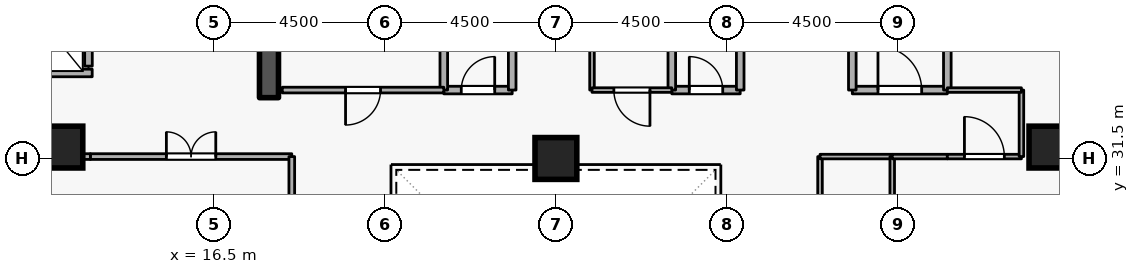
"""IFC4 building model, lengths in metres.
Left out: names, types, materials, properties, quantities, classifications, styles, units other than length and angle.
Written with IfcOpenShell. Run it as: python <this file> out.ifc"""

import sys

from ifc_helpers import new_model, si_unit, direction, frame, frame_2d, origin, origin_2d, place, context, subcontext, project, spatial, rectangle, extrude, element, fill, save


model = new_model("IFC4")
c1 = context("Model", 3, precision=1e-05, world=origin(), true_north=direction((0.0, 1.0)))
c2 = subcontext(c1, "Body", "Model", "MODEL_VIEW")
j1 = project(units=[si_unit("LENGTHUNIT", "METRE"), si_unit("PLANEANGLEUNIT", "RADIAN")], contexts=[c1])
p1 = place(None, origin())
s1 = spatial("IfcSite", under=j1, at=p1, CompositionType="ELEMENT")
p2 = place(p1, origin())
s2 = spatial("IfcBuilding", under=s1, at=p2, CompositionType="ELEMENT")
p3 = place(p2, frame((0.0, 0.0, 192.9)))
s3 = spatial("IfcBuildingStorey", under=s2, at=p3, CompositionType="ELEMENT", Elevation=192.9)
p4 = place(p3, frame((17.95, 33.1, 0.0), z_axis=(0.0, 0.0, 1.0), x_axis=(0.0, 1.0, 0.0)))
e1 = element("IfcWall", 1, at=p4, inside=s3, PredefinedType="SHEAR", context=c2, shape_type="SweptSolid", body=[
    extrude(rectangle(XDim=5.8, YDim=0.5, at=frame_2d((2.9, 0.0))), origin(), (0.0, 0.0, 1.0), 3.6),
])
for number, where, z_axis, x_axis in (
    (2, (12.5, 31.8, 0.0), (0.0, 0.0, 1.0), (1.0, 0.0, 0.0)),
    (3, (38.5, 31.8, 0.0), (0.0, 0.0, 1.0), (1.0, 0.0, 0.0)),
    (4, (25.5, 31.5, 0.0), (0.0, 0.0, 1.0), (1.0, 0.0, 0.0)),
):
    element("IfcColumn", number, at=place(p3, frame(where, z_axis=z_axis, x_axis=x_axis)), inside=s3, PredefinedType="COLUMN", context=c2, shape_type="SweptSolid", body=[
        extrude(rectangle(XDim=1.1, YDim=1.1, at=origin_2d()), origin(), (0.0, 0.0, 1.0), 3.6),
    ])
p5 = place(p3, frame((13.2, 33.93, 0.0), z_axis=(0.0, 0.0, 1.0), x_axis=(0.0, 1.0, 0.0)))
e5 = element("IfcWall", 5, at=p5, inside=s3, PredefinedType="STANDARD", context=c2, shape_type="SweptSolid", body=[
    extrude(rectangle(XDim=1.94, YDim=0.2, at=frame_2d((0.97, 0.0))), origin(), (0.0, 0.0, 1.0), 3.34),
])
p6 = place(p5, frame((0.46, 0.0, 0.0)))
e6 = element("IfcOpeningElement", 6, at=p6, cuts=e5, PredefinedType="OPENING", context=c2, shape_type="SweptSolid", body=[
    extrude(rectangle(XDim=1.02, YDim=2.06, at=frame_2d((0.51, 1.03))), frame((0.0, 0.11, 0.0), z_axis=(0.0, -1.0, 0.0), x_axis=(1.0, 0.0, 0.0)), (0.0, 0.0, 1.0), 0.22),
])
p7 = place(p3, frame((11.002, 33.75, 0.0), z_axis=(0.0, 0.0, 1.0), x_axis=(1.0, 0.0, 0.0)))
e7 = element("IfcWall", 7, at=p7, inside=s3, PredefinedType="STANDARD", context=c2, shape_type="SweptSolid", body=[
    extrude(rectangle(XDim=2.296, YDim=0.2, at=frame_2d((1.148, 0.0))), origin(), (0.0, 0.0, 1.0), 3.34),
])
p8 = place(p3, frame((33.3, 33.3, 0.0), z_axis=(0.0, 0.0, 1.0), x_axis=(1.0, 0.0, 0.0)))
e8 = element("IfcWall", 8, at=p8, inside=s3, PredefinedType="STANDARD", context=c2, shape_type="SweptSolid", body=[
    extrude(rectangle(XDim=2.5, YDim=0.2, at=frame_2d((1.25, 0.0))), origin(), (0.0, 0.0, 1.0), 3.34),
])
p9 = place(p8, frame((0.675, 0.0, 0.0)))
e9 = element("IfcOpeningElement", 9, at=p9, cuts=e8, PredefinedType="OPENING", context=c2, shape_type="SweptSolid", body=[
    extrude(rectangle(XDim=1.15, YDim=2.1, at=frame_2d((0.575, 1.05))), frame((0.0, 0.11, 0.0), z_axis=(0.0, -1.0, 0.0), x_axis=(1.0, 0.0, 0.0)), (0.0, 0.0, 1.0), 0.22),
])
p10 = place(p3, frame((35.8, 33.3, 0.0), z_axis=(0.0, 0.0, 1.0), x_axis=(0.0, 1.0, 0.0)))
e10 = element("IfcWall", 10, at=p10, inside=s3, PredefinedType="STANDARD", context=c2, shape_type="SweptSolid", body=[
    extrude(rectangle(XDim=5.7, YDim=0.2, at=frame_2d((2.85, 0.0))), origin(), (0.0, 0.0, 1.0), 3.34),
])
p11 = place(p3, frame((33.3, 35.6, 0.0), z_axis=(0.0, 0.0, 1.0), x_axis=(0.0, -1.0, 0.0)))
e11 = element("IfcWall", 11, at=p11, inside=s3, PredefinedType="STANDARD", context=c2, shape_type="SweptSolid", body=[
    extrude(rectangle(XDim=2.3, YDim=0.2, at=frame_2d((1.15, 0.0))), origin(), (0.0, 0.0, 1.0), 2.545),
])
p12 = place(p3, frame((22.55, 33.3, 0.0), z_axis=(0.0, 0.0, 1.0), x_axis=(1.0, 0.0, 0.0)))
e12 = element("IfcWall", 12, at=p12, inside=s3, PredefinedType="STANDARD", context=c2, shape_type="SweptSolid", body=[
    extrude(rectangle(XDim=1.8, YDim=0.2, at=frame_2d((0.9, 0.0))), origin(), (0.0, 0.0, 1.0), 3.34),
])
p13 = place(p12, frame((0.46, 0.0, 0.0)))
e13 = element("IfcOpeningElement", 13, at=p13, cuts=e12, PredefinedType="OPENING", context=c2, shape_type="SweptSolid", body=[
    extrude(rectangle(XDim=0.88, YDim=2.04, at=frame_2d((0.44, 1.02))), frame((0.0, 0.11, 0.0), z_axis=(0.0, -1.0, 0.0), x_axis=(1.0, 0.0, 0.0)), (0.0, 0.0, 1.0), 0.22),
])
for number, where, z_axis, x_axis in (
    (14, (24.35, 33.3, 0.0), (0.0, 0.0, 1.0), (0.0, 1.0, 0.0)),
    (15, (22.55, 35.35, 0.0), (0.0, 0.0, 1.0), (0.0, -1.0, 0.0)),
):
    element("IfcWall", number, at=place(p3, frame(where, z_axis=z_axis, x_axis=x_axis)), inside=s3, PredefinedType="STANDARD", context=c2, shape_type="SweptSolid", body=[
        extrude(rectangle(XDim=2.05, YDim=0.2, at=frame_2d((1.025, 0.0))), origin(), (0.0, 0.0, 1.0), 3.34),
    ])
p14 = place(p3, frame((28.55, 33.3, 0.0), z_axis=(0.0, 0.0, 1.0), x_axis=(1.0, 0.0, 0.0)))
e16 = element("IfcWall", 16, at=p14, inside=s3, PredefinedType="STANDARD", context=c2, shape_type="SweptSolid", body=[
    extrude(rectangle(XDim=1.8, YDim=0.2, at=frame_2d((0.9, 0.0))), origin(), (0.0, 0.0, 1.0), 3.34),
])
p15 = place(p14, frame((0.46, 0.0, 0.0)))
e17 = element("IfcOpeningElement", 17, at=p15, cuts=e16, PredefinedType="OPENING", context=c2, shape_type="SweptSolid", body=[
    extrude(rectangle(XDim=0.88, YDim=2.04, at=frame_2d((0.44, 1.02))), frame((0.0, 0.11, 0.0), z_axis=(0.0, -1.0, 0.0), x_axis=(1.0, 0.0, 0.0)), (0.0, 0.0, 1.0), 0.22),
])
for number, where, z_axis, x_axis in (
    (18, (30.35, 33.3, 0.0), (0.0, 0.0, 1.0), (0.0, 1.0, 0.0)),
    (19, (28.55, 35.35, 0.0), (0.0, 0.0, 1.0), (0.0, -1.0, 0.0)),
):
    element("IfcWall", number, at=place(p3, frame(where, z_axis=z_axis, x_axis=x_axis)), inside=s3, PredefinedType="STANDARD", context=c2, shape_type="SweptSolid", body=[
        extrude(rectangle(XDim=2.05, YDim=0.2, at=frame_2d((1.025, 0.0))), origin(), (0.0, 0.0, 1.0), 3.34),
    ])
p16 = place(p3, frame((22.55, 33.3, 0.0), z_axis=(0.0, 0.0, 1.0), x_axis=(-1.0, 0.0, 0.0)))
e20 = element("IfcWall", 20, at=p16, inside=s3, PredefinedType="PARTITIONING", context=c2, shape_type="SweptSolid", body=[
    extrude(rectangle(XDim=4.25, YDim=0.15, at=frame_2d((2.125, 0.0))), origin(), (0.0, 0.0, 1.0), 3.34),
])
p17 = place(p16, frame((1.665, 0.0, 0.0)))
e21 = element("IfcOpeningElement", 21, at=p17, cuts=e20, PredefinedType="OPENING", context=c2, shape_type="SweptSolid", body=[
    extrude(rectangle(XDim=0.92, YDim=2.08, at=frame_2d((0.46, 1.04))), frame((0.0, 0.085, 0.0), z_axis=(0.0, -1.0, 0.0), x_axis=(1.0, 0.0, 0.0)), (0.0, 0.0, 1.0), 0.17),
])
p18 = place(p3, frame((26.45, 33.3, 0.0), z_axis=(0.0, 0.0, 1.0), x_axis=(0.0, 1.0, 0.0)))
e22 = element("IfcWall", 22, at=p18, inside=s3, PredefinedType="PARTITIONING", context=c2, shape_type="SweptSolid", body=[
    extrude(rectangle(XDim=2.05, YDim=0.12, at=frame_2d((1.025, 0.0))), origin(), (0.0, 0.0, 1.0), 3.34),
])
p19 = place(p3, frame((28.55, 33.3, 0.0), z_axis=(0.0, 0.0, 1.0), x_axis=(-1.0, 0.0, 0.0)))
e23 = element("IfcWall", 23, at=p19, inside=s3, PredefinedType="PARTITIONING", context=c2, shape_type="SweptSolid", body=[
    extrude(rectangle(XDim=2.1, YDim=0.12, at=frame_2d((1.05, 0.0))), origin(), (0.0, 0.0, 1.0), 3.34),
])
p20 = place(p19, frame((0.575, 0.0, 0.0)))
e24 = element("IfcOpeningElement", 24, at=p20, cuts=e23, PredefinedType="OPENING", context=c2, shape_type="SweptSolid", body=[
    extrude(rectangle(XDim=0.95, YDim=2.1, at=frame_2d((0.475, 1.05))), frame((0.0, 0.07, 0.0), z_axis=(0.0, -1.0, 0.0), x_axis=(1.0, 0.0, 0.0)), (0.0, 0.0, 1.0), 0.14),
])
p21 = place(p3, frame((13.25, 31.55, 0.0), z_axis=(0.0, 0.0, 1.0), x_axis=(1.0, 0.0, 0.0)))
e25 = element("IfcWall", 25, at=p21, inside=s3, PredefinedType="PARTITIONING", context=c2, shape_type="SweptSolid", body=[
    extrude(rectangle(XDim=5.3, YDim=0.15, at=frame_2d((2.65, 0.0))), origin(), (0.0, 0.0, 1.0), 3.34),
])
p22 = place(p21, frame((2.0, 0.0, 0.0)))
e26 = element("IfcOpeningElement", 26, at=p22, cuts=e25, PredefinedType="OPENING", context=c2, shape_type="SweptSolid", body=[
    extrude(rectangle(XDim=1.3, YDim=2.12, at=frame_2d((0.65, 1.06))), frame((0.0, 0.085, 0.0), z_axis=(0.0, -1.0, 0.0), x_axis=(1.0, 0.0, 0.0)), (0.0, 0.0, 1.0), 0.17),
])
p23 = place(p3, frame((18.55, 31.55, 0.0), z_axis=(0.0, 0.0, 1.0), x_axis=(0.0, -1.0, 0.0)))
e27 = element("IfcWall", 27, at=p23, inside=s3, PredefinedType="PARTITIONING", context=c2, shape_type="SweptSolid", body=[
    extrude(rectangle(XDim=2.25, YDim=0.15, at=frame_2d((1.125, 0.0))), origin(), (0.0, 0.0, 1.0), 3.34),
])
p24 = place(p3, frame((10.9, 31.55, 0.0), z_axis=(0.0, 0.0, 1.0), x_axis=(1.0, 0.0, 0.0)))
e28 = element("IfcWall", 28, at=p24, inside=s3, PredefinedType="PARTITIONING", context=c2, shape_type="SweptSolid", body=[
    extrude(rectangle(XDim=2.35, YDim=0.15, at=frame_2d((1.175, 0.0))), origin(), (0.0, 0.0, 1.0), 3.34),
])
p25 = place(p3, frame((32.45, 27.0, 0.0), z_axis=(0.0, 0.0, 1.0), x_axis=(0.0, 1.0, 0.0)))
e29 = element("IfcWall", 29, at=p25, inside=s3, PredefinedType="PARTITIONING", context=c2, shape_type="SweptSolid", body=[
    extrude(rectangle(XDim=4.55, YDim=0.12, at=frame_2d((2.275, 0.0))), origin(), (0.0, 0.0, 1.0), 3.34),
])
p26 = place(p25, frame((1.8, 0.0, 0.0)))
e30 = element("IfcOpeningElement", 30, at=p26, cuts=e29, PredefinedType="OPENING", context=c2, shape_type="SweptSolid", body=[
    extrude(rectangle(XDim=0.95, YDim=2.1, at=frame_2d((0.475, 1.05))), frame((0.0, 0.07, 0.0), z_axis=(0.0, -1.0, 0.0), x_axis=(1.0, 0.0, 0.0)), (0.0, 0.0, 1.0), 0.14),
])
p27 = place(p3, frame((32.45, 31.55, 0.0), z_axis=(0.0, 0.0, 1.0), x_axis=(1.0, 0.0, 0.0)))
e31 = element("IfcWall", 31, at=p27, inside=s3, PredefinedType="PARTITIONING", context=c2, shape_type="SweptSolid", body=[
    extrude(rectangle(XDim=1.9, YDim=0.12, at=frame_2d((0.95, 0.0))), origin(), (0.0, 0.0, 1.0), 3.34),
])
p28 = place(p3, frame((34.35, 31.55, 0.0), z_axis=(0.0, 0.0, 1.0), x_axis=(0.0, -1.0, 0.0)))
e32 = element("IfcWall", 32, at=p28, inside=s3, PredefinedType="PARTITIONING", context=c2, shape_type="SweptSolid", body=[
    extrude(rectangle(XDim=4.55, YDim=0.12, at=frame_2d((2.275, 0.0))), origin(), (0.0, 0.0, 1.0), 3.34),
])
p29 = place(p3, frame((34.35, 31.55, 0.0), z_axis=(0.0, 0.0, 1.0), x_axis=(1.0, 0.0, 0.0)))
e33 = element("IfcWall", 33, at=p29, inside=s3, PredefinedType="PARTITIONING", context=c2, shape_type="SweptSolid", body=[
    extrude(rectangle(XDim=1.45, YDim=0.12, at=frame_2d((0.725, 0.0))), origin(), (0.0, 0.0, 1.0), 3.34),
])
p30 = place(p3, frame((35.8, 31.55, 0.0), z_axis=(0.0, 0.0, 1.0), x_axis=(1.0, 0.0, 0.0)))
e34 = element("IfcWall", 34, at=p30, inside=s3, PredefinedType="PARTITIONING", context=c2, shape_type="SweptSolid", body=[
    extrude(rectangle(XDim=1.95, YDim=0.12, at=frame_2d((0.975, 0.0))), origin(), (0.0, 0.0, 1.0), 3.34),
])
p31 = place(p30, frame((0.45, 0.0, 0.0)))
e35 = element("IfcOpeningElement", 35, at=p31, cuts=e34, PredefinedType="OPENING", context=c2, shape_type="SweptSolid", body=[
    extrude(rectangle(XDim=1.05, YDim=2.1, at=frame_2d((0.525, 1.05))), frame((0.0, 0.07, 0.0), z_axis=(0.0, -1.0, 0.0), x_axis=(1.0, 0.0, 0.0)), (0.0, 0.0, 1.0), 0.14),
])
p32 = place(p3, frame((37.75, 31.55, 0.0), z_axis=(0.0, 0.0, 1.0), x_axis=(0.0, 1.0, 0.0)))
e36 = element("IfcWall", 36, at=p32, inside=s3, PredefinedType="PARTITIONING", context=c2, shape_type="SweptSolid", body=[
    extrude(rectangle(XDim=1.75, YDim=0.12, at=frame_2d((0.875, 0.0))), origin(), (0.0, 0.0, 1.0), 3.34),
])
p33 = place(p3, frame((37.75, 33.3, 0.0), z_axis=(0.0, 0.0, 1.0), x_axis=(-1.0, 0.0, 0.0)))
e37 = element("IfcWall", 37, at=p33, inside=s3, PredefinedType="PARTITIONING", context=c2, shape_type="SweptSolid", body=[
    extrude(rectangle(XDim=1.95, YDim=0.12, at=frame_2d((0.975, 0.0))), origin(), (0.0, 0.0, 1.0), 3.34),
])
p34 = place(p9, origin())
e38 = element("IfcDoor", 38, at=p34, inside=s3, OperationType="SINGLE_SWING_LEFT", PredefinedType="DOOR", context=c2, shape_type="SweptSolid", body=[
    extrude(rectangle(XDim=1.15, YDim=2.1, at=frame_2d((0.575, 1.05))), frame((0.0, 0.025, 0.0), z_axis=(0.0, -1.0, 0.0), x_axis=(1.0, 0.0, 0.0)), (0.0, 0.0, 1.0), 0.05),
])
fill(e9, e38)
p35 = place(p13, origin())
e39 = element("IfcDoor", 39, at=p35, inside=s3, OperationType="SINGLE_SWING_RIGHT", PredefinedType="DOOR", context=c2, shape_type="SweptSolid", body=[
    extrude(rectangle(XDim=0.88, YDim=2.04, at=frame_2d((0.44, 1.02))), frame((0.0, 0.025, 0.0), z_axis=(0.0, -1.0, 0.0), x_axis=(1.0, 0.0, 0.0)), (0.0, 0.0, 1.0), 0.05),
])
fill(e13, e39)
p36 = place(p15, origin())
e40 = element("IfcDoor", 40, at=p36, inside=s3, OperationType="SINGLE_SWING_LEFT", PredefinedType="DOOR", context=c2, shape_type="SweptSolid", body=[
    extrude(rectangle(XDim=0.88, YDim=2.04, at=frame_2d((0.44, 1.02))), frame((0.0, 0.025, 0.0), z_axis=(0.0, -1.0, 0.0), x_axis=(1.0, 0.0, 0.0)), (0.0, 0.0, 1.0), 0.05),
])
fill(e17, e40)
p37 = place(p17, origin())
e41 = element("IfcDoor", 41, at=p37, inside=s3, OperationType="SINGLE_SWING_RIGHT", PredefinedType="DOOR", context=c2, shape_type="SweptSolid", body=[
    extrude(rectangle(XDim=0.92, YDim=2.08, at=frame_2d((0.46, 1.04))), frame((0.0, 0.025, 0.0), z_axis=(0.0, -1.0, 0.0), x_axis=(1.0, 0.0, 0.0)), (0.0, 0.0, 1.0), 0.05),
])
fill(e21, e41)
p38 = place(p20, origin())
e42 = element("IfcDoor", 42, at=p38, inside=s3, OperationType="SINGLE_SWING_LEFT", PredefinedType="DOOR", context=c2, shape_type="SweptSolid", body=[
    extrude(rectangle(XDim=0.95, YDim=2.1, at=frame_2d((0.475, 1.05))), frame((0.0, 0.025, 0.0), z_axis=(0.0, -1.0, 0.0), x_axis=(1.0, 0.0, 0.0)), (0.0, 0.0, 1.0), 0.05),
])
fill(e24, e42)
p39 = place(p22, origin())
e43 = element("IfcDoor", 43, at=p39, inside=s3, OperationType="DOUBLE_DOOR_SINGLE_SWING", PredefinedType="DOOR", context=c2, shape_type="SweptSolid", body=[
    extrude(rectangle(XDim=1.3, YDim=2.12, at=frame_2d((0.65, 1.06))), frame((0.0, 0.025, 0.0), z_axis=(0.0, -1.0, 0.0), x_axis=(1.0, 0.0, 0.0)), (0.0, 0.0, 1.0), 0.05),
])
fill(e26, e43)
p40 = place(p31, origin())
e44 = element("IfcDoor", 44, at=p40, inside=s3, OperationType="SINGLE_SWING_LEFT", PredefinedType="DOOR", context=c2, shape_type="SweptSolid", body=[
    extrude(rectangle(XDim=1.05, YDim=2.1, at=frame_2d((0.525, 1.05))), frame((0.0, 0.025, 0.0), z_axis=(0.0, -1.0, 0.0), x_axis=(1.0, 0.0, 0.0)), (0.0, 0.0, 1.0), 0.05),
])
fill(e35, e44)
save(model, sys.argv[1])
